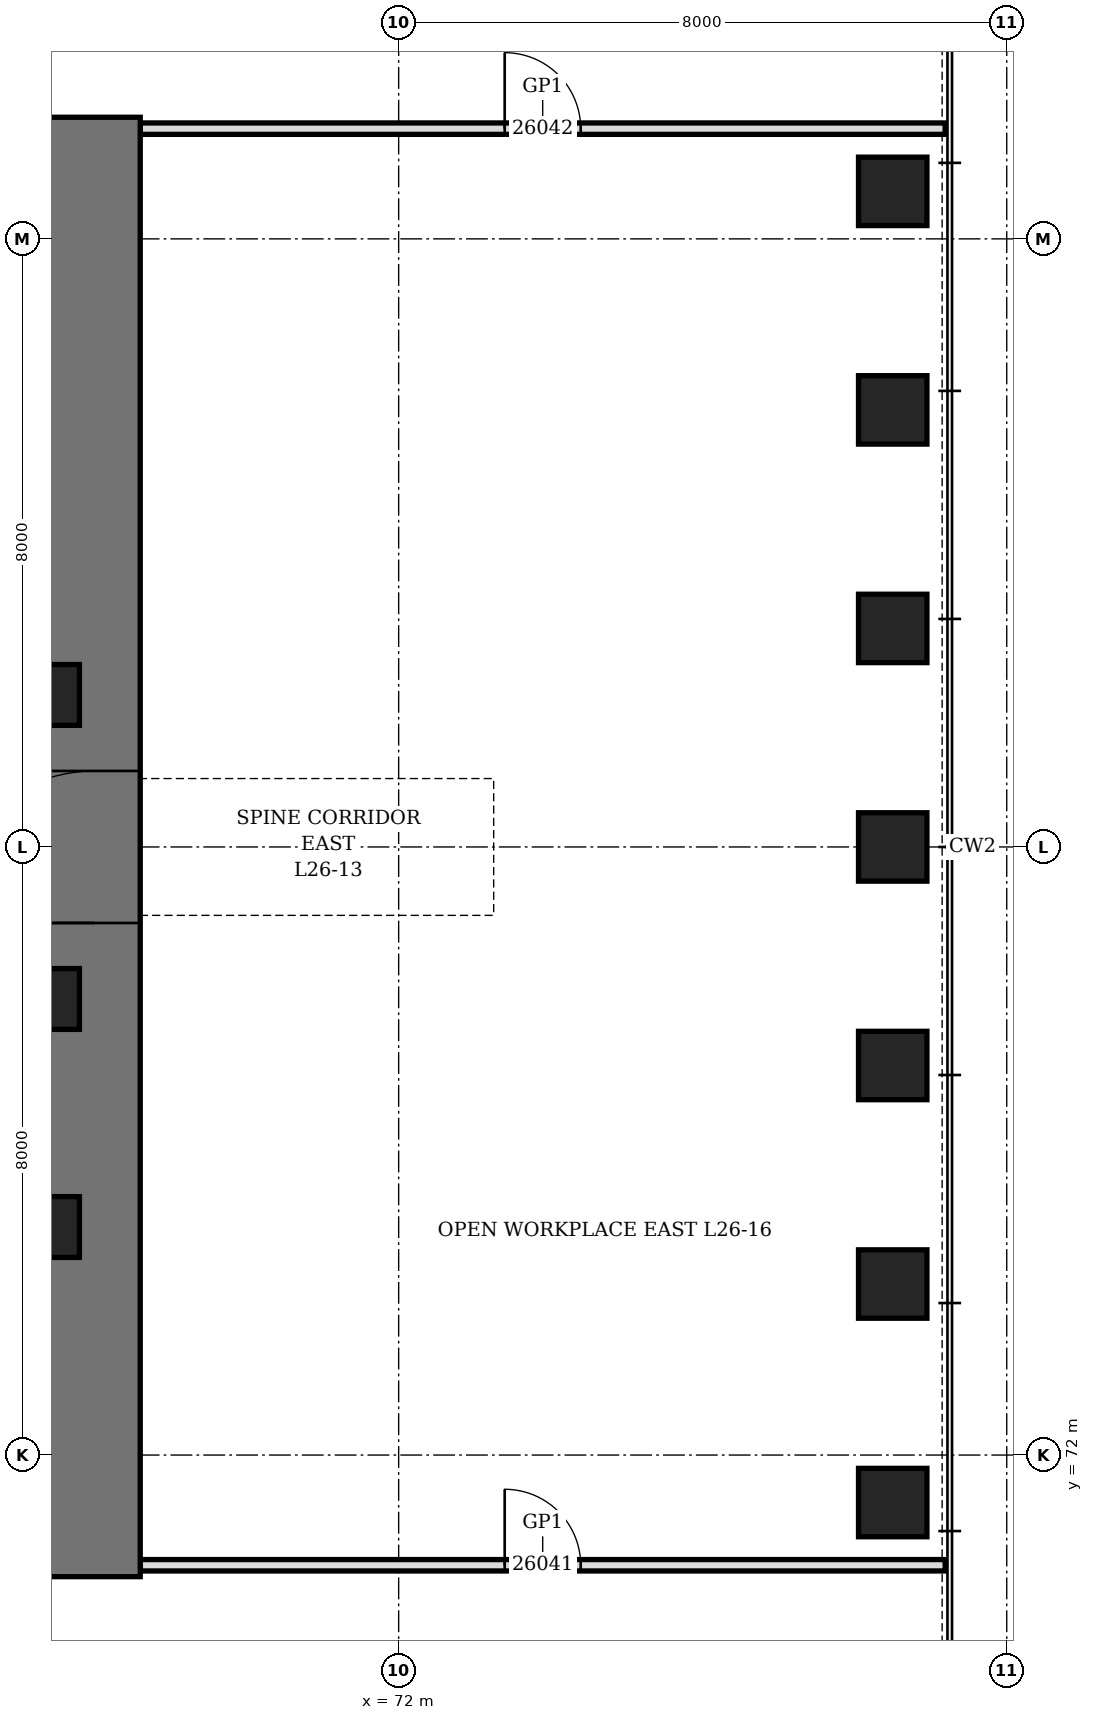
"""IFC4 building model, lengths in metres.
Left out: names, types, materials, properties, quantities, classifications, styles, units other than length and angle.
Written with IfcOpenShell. Run it as: python <this file> out.ifc"""

import sys

from ifc_helpers import new_model, si_unit, direction, frame, frame_2d, origin, origin_2d, place, context, subcontext, project, spatial, rectangle, hollow_rectangle, extrude, element, fill, save


model = new_model("IFC4")
c1 = context("Model", 3, precision=1e-05, world=origin(), true_north=direction((0.0, 1.0)))
c2 = subcontext(c1, "Body", "Model", "MODEL_VIEW")
j1 = project(units=[si_unit("LENGTHUNIT", "METRE"), si_unit("PLANEANGLEUNIT", "RADIAN")], contexts=[c1])
p1 = place(None, origin())
s1 = spatial("IfcSite", under=j1, at=p1, CompositionType="ELEMENT")
p2 = place(p1, origin())
s2 = spatial("IfcBuilding", under=s1, at=p2, CompositionType="ELEMENT")
p3 = place(p2, frame((0.0, 0.0, 120.7)))
s3 = spatial("IfcBuildingStorey", under=s2, at=p3, CompositionType="ELEMENT", Elevation=120.7)
for number, where, z_axis, x_axis in (
    (1, (78.5, 71.375, 0.0), (0.0, 0.0, 1.0), (0.0, 1.0, 0.0)),
    (2, (78.5, 74.25, 0.0), (0.0, 0.0, 1.0), (0.0, 1.0, 0.0)),
    (3, (78.5, 77.125, 0.0), (0.0, 0.0, 1.0), (0.0, 1.0, 0.0)),
    (4, (78.5, 80.0, 0.0), (0.0, 0.0, 1.0), (0.0, 1.0, 0.0)),
    (5, (78.5, 82.875, 0.0), (0.0, 0.0, 1.0), (0.0, 1.0, 0.0)),
    (6, (78.5, 85.75, 0.0), (0.0, 0.0, 1.0), (0.0, 1.0, 0.0)),
    (7, (78.5, 88.625, 0.0), (0.0, 0.0, 1.0), (0.0, 1.0, 0.0)),
):
    element("IfcColumn", number, at=place(p3, frame(where, z_axis=z_axis, x_axis=x_axis)), inside=s3, PredefinedType="COLUMN", context=c2, shape_type="SweptSolid", body=[
        extrude(hollow_rectangle(XDim=0.9, YDim=0.9, WallThickness=0.15, at=origin_2d()), origin(), (0.0, 0.0, 1.0), 4.2),
    ])
p4 = place(p3, frame((68.0, 70.4, 0.0), z_axis=(0.0, 0.0, 1.0), x_axis=(0.0, 1.0, 0.0)))
e8 = element("IfcWall", 8, at=p4, inside=s3, PredefinedType="SHEAR", context=c2, shape_type="SweptSolid", body=[
    extrude(rectangle(XDim=19.2, YDim=1.2, at=frame_2d((9.6, 0.0))), origin(), (0.0, 0.0, 1.0), 4.2),
])
p5 = place(p4, frame((8.6, 0.0, 0.0)))
e9 = element("IfcOpeningElement", 9, at=p5, cuts=e8, PredefinedType="OPENING", context=c2, shape_type="SweptSolid", body=[
    extrude(rectangle(XDim=2.0, YDim=2.4, at=frame_2d((1.0, 1.2))), frame((0.0, 0.61, 0.0), z_axis=(0.0, -1.0, 0.0), x_axis=(1.0, 0.0, 0.0)), (0.0, 0.0, 1.0), 1.22),
])
for number, where, z_axis, x_axis in (
    (10, (67.4, 75.0, 0.0), (0.0, 0.0, 1.0), (1.0, 0.0, 0.0)),
    (11, (67.4, 78.0, 0.0), (0.0, 0.0, 1.0), (1.0, 0.0, 0.0)),
    (12, (67.4, 82.0, 0.0), (0.0, 0.0, 1.0), (1.0, 0.0, 0.0)),
):
    element("IfcColumn", number, at=place(p3, frame(where, z_axis=z_axis, x_axis=x_axis)), inside=s3, PredefinedType="COLUMN", context=c2, shape_type="SweptSolid", body=[
        extrude(hollow_rectangle(XDim=0.8, YDim=0.8, WallThickness=0.1, at=origin_2d()), origin(), (0.0, 0.0, 1.0), 4.2),
    ])
p6 = place(p3, frame((68.6, 70.55, 0.0), z_axis=(0.0, 0.0, 1.0), x_axis=(1.0, 0.0, 0.0)))
e13 = element("IfcWall", 13, at=p6, inside=s3, PredefinedType="PARTITIONING", context=c2, shape_type="SweptSolid", body=[
    extrude(rectangle(XDim=10.59, YDim=0.15, at=frame_2d((5.295, 0.0))), origin(), (0.0, 0.0, 1.0), 4.04),
])
p7 = place(p6, frame((4.795, 0.0, 0.0)))
e14 = element("IfcOpeningElement", 14, at=p7, cuts=e13, PredefinedType="OPENING", context=c2, shape_type="SweptSolid", body=[
    extrude(rectangle(XDim=1.0, YDim=2.4, at=frame_2d((0.5, 1.2))), frame((0.0, 0.085, 0.0), z_axis=(0.0, -1.0, 0.0), x_axis=(1.0, 0.0, 0.0)), (0.0, 0.0, 1.0), 0.17),
])
p8 = place(p3, frame((68.6, 89.45, 0.0), z_axis=(0.0, 0.0, 1.0), x_axis=(1.0, 0.0, 0.0)))
e15 = element("IfcWall", 15, at=p8, inside=s3, PredefinedType="PARTITIONING", context=c2, shape_type="SweptSolid", body=[
    extrude(rectangle(XDim=10.59, YDim=0.15, at=frame_2d((5.295, 0.0))), origin(), (0.0, 0.0, 1.0), 4.04),
])
p9 = place(p8, frame((4.795, 0.0, 0.0)))
e16 = element("IfcOpeningElement", 16, at=p9, cuts=e15, PredefinedType="OPENING", context=c2, shape_type="SweptSolid", body=[
    extrude(rectangle(XDim=1.0, YDim=2.4, at=frame_2d((0.5, 1.2))), frame((0.0, 0.085, 0.0), z_axis=(0.0, -1.0, 0.0), x_axis=(1.0, 0.0, 0.0)), (0.0, 0.0, 1.0), 0.17),
])
p10 = place(p5, origin())
e17 = element("IfcDoor", 17, at=p10, inside=s3, OperationType="DOUBLE_DOOR_SINGLE_SWING", PredefinedType="DOOR", context=c2, shape_type="SweptSolid", body=[
    extrude(rectangle(XDim=2.0, YDim=2.4, at=frame_2d((1.0, 1.2))), frame((0.0, 0.35, 0.0), z_axis=(0.0, -1.0, 0.0), x_axis=(1.0, 0.0, 0.0)), (0.0, 0.0, 1.0), 0.7),
])
fill(e9, e17)
p11 = place(p7, origin())
e18 = element("IfcDoor", 18, at=p11, inside=s3, OperationType="SINGLE_SWING_RIGHT", PredefinedType="DOOR", context=c2, shape_type="SweptSolid", body=[
    extrude(rectangle(XDim=1.0, YDim=2.4, at=frame_2d((0.5, 1.2))), frame((0.0, 0.075, 0.0), z_axis=(0.0, -1.0, 0.0), x_axis=(1.0, 0.0, 0.0)), (0.0, 0.0, 1.0), 0.149),
])
fill(e14, e18)
p12 = place(p9, origin())
e19 = element("IfcDoor", 19, at=p12, inside=s3, OperationType="SINGLE_SWING_RIGHT", PredefinedType="DOOR", context=c2, shape_type="SweptSolid", body=[
    extrude(rectangle(XDim=1.0, YDim=2.4, at=frame_2d((0.5, 1.2))), frame((0.0, 0.075, 0.0), z_axis=(0.0, -1.0, 0.0), x_axis=(1.0, 0.0, 0.0)), (0.0, 0.0, 1.0), 0.149),
])
fill(e16, e19)
save(model, sys.argv[1])
